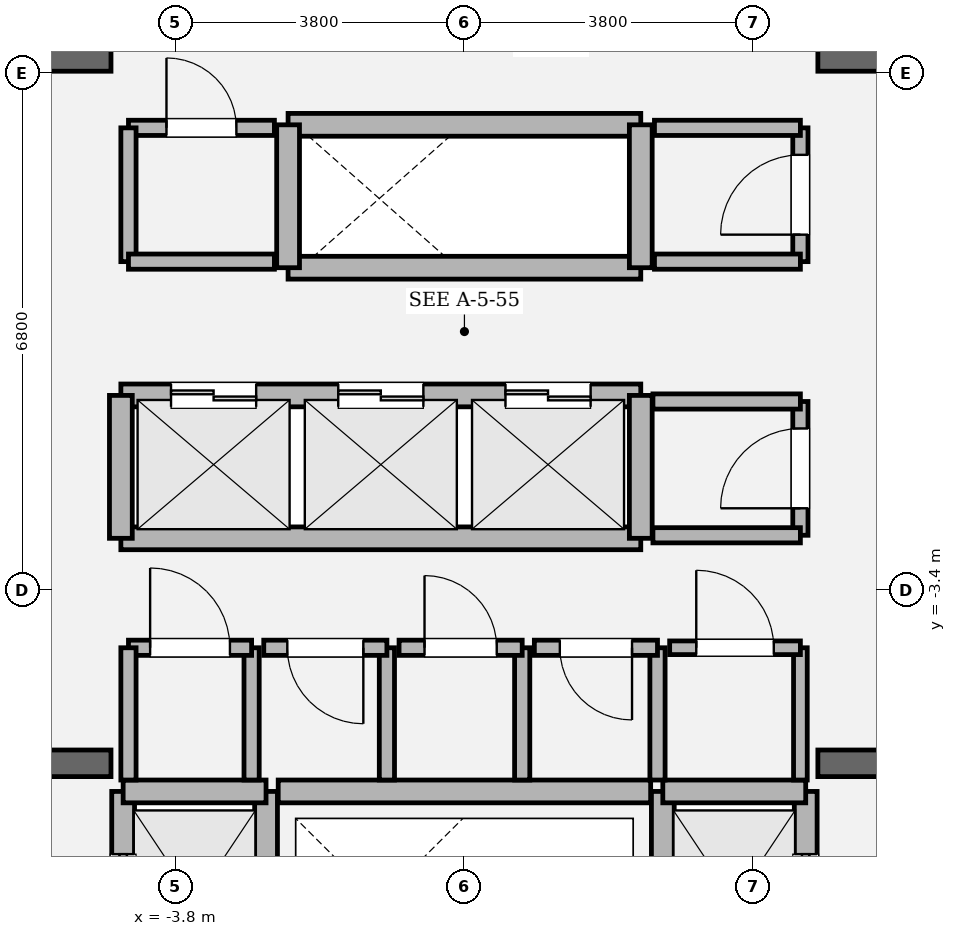
"""IFC4 building model, lengths in metres.
Left out: names, types, materials, properties, quantities, classifications, styles, units other than length and angle.
Written with IfcOpenShell. Run it as: python <this file> out.ifc"""

import sys

from ifc_helpers import new_model, si_unit, direction, frame, frame_2d, origin, place, context, subcontext, project, spatial, rectangle, extrude, element, fill, save


model = new_model("IFC4")
c1 = context("Model", 3, precision=1e-05, world=origin(), true_north=direction((0.0, 1.0)))
c2 = subcontext(c1, "Body", "Model", "MODEL_VIEW")
j1 = project(units=[si_unit("LENGTHUNIT", "METRE"), si_unit("PLANEANGLEUNIT", "RADIAN")], contexts=[c1])
p1 = place(None, origin())
s1 = spatial("IfcSite", under=j1, at=p1, CompositionType="ELEMENT")
p2 = place(p1, origin())
s2 = spatial("IfcBuilding", under=s1, at=p2, CompositionType="ELEMENT")
p3 = place(p2, frame((0.0, 0.0, 271.65)))
s3 = spatial("IfcBuildingStorey", under=s2, at=p3, CompositionType="ELEMENT", Elevation=271.65)
p4 = place(p3, frame((-9.925, -5.68, 0.0), z_axis=(0.0, 0.0, 1.0), x_axis=(1.0, 0.0, 0.0)))
e1 = element("IfcWall", 1, at=p4, inside=s3, PredefinedType="SOLIDWALL", context=c2, shape_type="SweptSolid", body=[
    extrude(rectangle(XDim=5.275, YDim=0.35, at=frame_2d((2.638, 0.0))), origin(), (0.0, 0.0, 1.0), 4.05),
])
p5 = place(p4, frame((1.385, 0.0, 0.0)))
e2 = element("IfcOpeningElement", 2, at=p5, cuts=e1, PredefinedType="OPENING", context=c2, shape_type="SweptSolid", body=[
    extrude(rectangle(XDim=1.18, YDim=2.2, at=frame_2d((0.59, 1.1))), frame((0.0, 0.185, 0.0), z_axis=(0.0, -1.0, 0.0), x_axis=(1.0, 0.0, 0.0)), (0.0, 0.0, 1.0), 0.37),
])
p6 = place(p3, frame((4.65, -5.68, 0.0), z_axis=(0.0, 0.0, 1.0), x_axis=(1.0, 0.0, 0.0)))
e3 = element("IfcWall", 3, at=p6, inside=s3, PredefinedType="SOLIDWALL", context=c2, shape_type="SweptSolid", body=[
    extrude(rectangle(XDim=5.275, YDim=0.35, at=frame_2d((2.638, 0.0))), origin(), (0.0, 0.0, 1.0), 4.05),
])
p7 = place(p6, frame((2.71, 0.0, 0.0)))
e4 = element("IfcOpeningElement", 4, at=p7, cuts=e3, PredefinedType="OPENING", context=c2, shape_type="SweptSolid", body=[
    extrude(rectangle(XDim=1.18, YDim=2.2, at=frame_2d((0.59, 1.1))), frame((0.0, 0.185, 0.0), z_axis=(0.0, -1.0, 0.0), x_axis=(1.0, 0.0, 0.0)), (0.0, 0.0, 1.0), 0.37),
])
for number, where, z_axis, x_axis in (
    (5, (-9.925, 3.6, 0.0), (0.0, 0.0, 1.0), (1.0, 0.0, 0.0)),
    (6, (4.65, 3.6, 0.0), (0.0, 0.0, 1.0), (1.0, 0.0, 0.0)),
):
    element("IfcWall", number, at=place(p3, frame(where, z_axis=z_axis, x_axis=x_axis)), inside=s3, PredefinedType="SOLIDWALL", context=c2, shape_type="SweptSolid", body=[
        extrude(rectangle(XDim=5.275, YDim=0.35, at=frame_2d((2.638, 0.0))), origin(), (0.0, 0.0, 1.0), 4.05),
    ])
p8 = place(p3, frame((-4.49, -8.82, 0.0), z_axis=(0.0, 0.0, 1.0), x_axis=(0.0, 1.0, 0.0)))
e7 = element("IfcWall", 7, at=p8, inside=s3, PredefinedType="SOLIDWALL", context=c2, shape_type="SweptSolid", body=[
    extrude(rectangle(XDim=2.77, YDim=0.3, at=frame_2d((1.385, 0.0))), origin(), (0.0, 0.0, 1.0), 3.85),
])
p9 = place(p8, frame((0.825, 0.0, 0.0)))
e8 = element("IfcOpeningElement", 8, at=p9, cuts=e7, PredefinedType="OPENING", context=c2, shape_type="SweptSolid", body=[
    extrude(rectangle(XDim=1.12, YDim=2.25, at=frame_2d((0.56, 1.125))), frame((0.0, 0.16, 0.0), z_axis=(0.0, -1.0, 0.0), x_axis=(1.0, 0.0, 0.0)), (0.0, 0.0, 1.0), 0.32),
])
p10 = place(p3, frame((-2.61, -8.82, 0.0), z_axis=(0.0, 0.0, 1.0), x_axis=(0.0, 1.0, 0.0)))
e9 = element("IfcWall", 9, at=p10, inside=s3, PredefinedType="SOLIDWALL", context=c2, shape_type="SweptSolid", body=[
    extrude(rectangle(XDim=2.77, YDim=0.3, at=frame_2d((1.385, 0.0))), origin(), (0.0, 0.0, 1.0), 3.85),
])
p11 = place(p3, frame((-4.49, -6.05, 0.0), z_axis=(0.0, 0.0, 1.0), x_axis=(1.0, 0.0, 0.0)))
e10 = element("IfcWall", 10, at=p11, inside=s3, PredefinedType="SOLIDWALL", context=c2, shape_type="SweptSolid", body=[
    extrude(rectangle(XDim=1.88, YDim=0.3, at=frame_2d((0.94, 0.0))), origin(), (0.0, 0.0, 1.0), 3.85),
])
p12 = place(p3, frame((4.49, -8.82, 0.0), z_axis=(0.0, 0.0, 1.0), x_axis=(0.0, 1.0, 0.0)))
e11 = element("IfcWall", 11, at=p12, inside=s3, PredefinedType="SOLIDWALL", context=c2, shape_type="SweptSolid", body=[
    extrude(rectangle(XDim=2.77, YDim=0.3, at=frame_2d((1.385, 0.0))), origin(), (0.0, 0.0, 1.0), 3.85),
])
p13 = place(p12, frame((0.825, 0.0, 0.0)))
e12 = element("IfcOpeningElement", 12, at=p13, cuts=e11, PredefinedType="OPENING", context=c2, shape_type="SweptSolid", body=[
    extrude(rectangle(XDim=1.12, YDim=2.25, at=frame_2d((0.56, 1.125))), frame((0.0, 0.16, 0.0), z_axis=(0.0, -1.0, 0.0), x_axis=(1.0, 0.0, 0.0)), (0.0, 0.0, 1.0), 0.32),
])
p14 = place(p3, frame((2.61, -8.82, 0.0), z_axis=(0.0, 0.0, 1.0), x_axis=(0.0, 1.0, 0.0)))
e13 = element("IfcWall", 13, at=p14, inside=s3, PredefinedType="SOLIDWALL", context=c2, shape_type="SweptSolid", body=[
    extrude(rectangle(XDim=2.77, YDim=0.3, at=frame_2d((1.385, 0.0))), origin(), (0.0, 0.0, 1.0), 3.85),
])
p15 = place(p3, frame((2.61, -6.05, 0.0), z_axis=(0.0, 0.0, 1.0), x_axis=(1.0, 0.0, 0.0)))
e14 = element("IfcWall", 14, at=p15, inside=s3, PredefinedType="SOLIDWALL", context=c2, shape_type="SweptSolid", body=[
    extrude(rectangle(XDim=1.88, YDim=0.3, at=frame_2d((0.94, 0.0))), origin(), (0.0, 0.0, 1.0), 3.85),
])
p16 = place(p3, frame((-4.52, -0.84, 0.0), z_axis=(0.0, 0.0, 1.0), x_axis=(1.0, 0.0, 0.0)))
e15 = element("IfcWall", 15, at=p16, inside=s3, PredefinedType="SOLIDWALL", context=c2, shape_type="SweptSolid", body=[
    extrude(rectangle(XDim=6.84, YDim=0.3, at=frame_2d((3.42, 0.0))), origin(), (0.0, 0.0, 1.0), 3.85),
])
p17 = place(p16, frame((0.66, 0.0, 0.0)))
e16 = element("IfcOpeningElement", 16, at=p17, cuts=e15, PredefinedType="OPENING", context=c2, shape_type="SweptSolid", body=[
    extrude(rectangle(XDim=1.12, YDim=2.25, at=frame_2d((0.56, 1.125))), frame((0.0, 0.16, 0.0), z_axis=(0.0, -1.0, 0.0), x_axis=(1.0, 0.0, 0.0)), (0.0, 0.0, 1.0), 0.32),
])
p18 = place(p16, frame((2.86, 0.0, 0.0)))
e17 = element("IfcOpeningElement", 17, at=p18, cuts=e15, PredefinedType="OPENING", context=c2, shape_type="SweptSolid", body=[
    extrude(rectangle(XDim=1.12, YDim=2.25, at=frame_2d((0.56, 1.125))), frame((0.0, 0.16, 0.0), z_axis=(0.0, -1.0, 0.0), x_axis=(1.0, 0.0, 0.0)), (0.0, 0.0, 1.0), 0.32),
])
p19 = place(p16, frame((5.06, 0.0, 0.0)))
e18 = element("IfcOpeningElement", 18, at=p19, cuts=e15, PredefinedType="OPENING", context=c2, shape_type="SweptSolid", body=[
    extrude(rectangle(XDim=1.12, YDim=2.25, at=frame_2d((0.56, 1.125))), frame((0.0, 0.16, 0.0), z_axis=(0.0, -1.0, 0.0), x_axis=(1.0, 0.0, 0.0)), (0.0, 0.0, 1.0), 0.32),
])
p20 = place(p3, frame((-4.52, -2.72, 0.0), z_axis=(0.0, 0.0, 1.0), x_axis=(1.0, 0.0, 0.0)))
e19 = element("IfcWall", 19, at=p20, inside=s3, PredefinedType="SOLIDWALL", context=c2, shape_type="SweptSolid", body=[
    extrude(rectangle(XDim=6.84, YDim=0.3, at=frame_2d((3.42, 0.0))), origin(), (0.0, 0.0, 1.0), 3.85),
])
for number, where, z_axis, x_axis in (
    (20, (-4.52, -2.72, 0.0), (0.0, 0.0, 1.0), (0.0, 1.0, 0.0)),
    (21, (2.32, -2.72, 0.0), (0.0, 0.0, 1.0), (0.0, 1.0, 0.0)),
):
    element("IfcWall", number, at=place(p3, frame(where, z_axis=z_axis, x_axis=x_axis)), inside=s3, PredefinedType="SOLIDWALL", context=c2, shape_type="SweptSolid", body=[
        extrude(rectangle(XDim=1.88, YDim=0.3, at=frame_2d((0.94, 0.0))), origin(), (0.0, 0.0, 1.0), 3.85),
    ])
for number, where, z_axis, x_axis in (
    (22, (-2.32, 0.84, 0.0), (0.0, 0.0, 1.0), (1.0, 0.0, 0.0)),
    (23, (-2.32, 2.72, 0.0), (0.0, 0.0, 1.0), (1.0, 0.0, 0.0)),
):
    element("IfcWall", number, at=place(p3, frame(where, z_axis=z_axis, x_axis=x_axis)), inside=s3, PredefinedType="SOLIDWALL", context=c2, shape_type="SweptSolid", body=[
        extrude(rectangle(XDim=4.64, YDim=0.3, at=frame_2d((2.32, 0.0))), origin(), (0.0, 0.0, 1.0), 3.85),
    ])
for number, where, z_axis, x_axis in (
    (24, (-2.32, 0.84, 0.0), (0.0, 0.0, 1.0), (0.0, 1.0, 0.0)),
    (25, (2.32, 0.84, 0.0), (0.0, 0.0, 1.0), (0.0, 1.0, 0.0)),
):
    element("IfcWall", number, at=place(p3, frame(where, z_axis=z_axis, x_axis=x_axis)), inside=s3, PredefinedType="SOLIDWALL", context=c2, shape_type="SweptSolid", body=[
        extrude(rectangle(XDim=1.88, YDim=0.3, at=frame_2d((0.94, 0.0))), origin(), (0.0, 0.0, 1.0), 3.85),
    ])
p21 = place(p3, frame((-2.45, -6.05, 0.0), z_axis=(0.0, 0.0, 1.0), x_axis=(1.0, 0.0, 0.0)))
e26 = element("IfcWall", 26, at=p21, inside=s3, PredefinedType="SOLIDWALL", context=c2, shape_type="SweptSolid", body=[
    extrude(rectangle(XDim=4.9, YDim=0.3, at=frame_2d((2.45, 0.0))), origin(), (0.0, 0.0, 1.0), 3.85),
])
p22 = place(p3, frame((-2.8, -5.9, 0.0), z_axis=(0.0, 0.0, 1.0), x_axis=(0.0, 1.0, 0.0)))
e27 = element("IfcWall", 27, at=p22, inside=s3, PredefinedType="SOLIDWALL", context=c2, shape_type="SweptSolid", body=[
    extrude(rectangle(XDim=1.74, YDim=0.2, at=frame_2d((0.87, 0.0))), origin(), (0.0, 0.0, 1.0), 3.85),
])
p23 = place(p3, frame((-2.8, -4.16, 0.0), z_axis=(0.0, 0.0, 1.0), x_axis=(-1.0, 0.0, 0.0)))
e28 = element("IfcWall", 28, at=p23, inside=s3, PredefinedType="SOLIDWALL", context=c2, shape_type="SweptSolid", body=[
    extrude(rectangle(XDim=1.62, YDim=0.2, at=frame_2d((0.81, 0.0))), origin(), (0.0, 0.0, 1.0), 3.85),
])
p24 = place(p23, frame((0.285, 0.0, 0.0)))
e29 = element("IfcOpeningElement", 29, at=p24, cuts=e28, PredefinedType="OPENING", context=c2, shape_type="SweptSolid", body=[
    extrude(rectangle(XDim=1.05, YDim=2.2, at=frame_2d((0.525, 1.1))), frame((0.0, 0.11, 0.0), z_axis=(0.0, -1.0, 0.0), x_axis=(1.0, 0.0, 0.0)), (0.0, 0.0, 1.0), 0.22),
])
for number, where, z_axis, x_axis in (
    (30, (-4.42, -4.16, 0.0), (0.0, 0.0, 1.0), (0.0, -1.0, 0.0)),
    (31, (-1.02, -5.9, 0.0), (0.0, 0.0, 1.0), (0.0, 1.0, 0.0)),
):
    element("IfcWall", number, at=place(p3, frame(where, z_axis=z_axis, x_axis=x_axis)), inside=s3, PredefinedType="SOLIDWALL", context=c2, shape_type="SweptSolid", body=[
        extrude(rectangle(XDim=1.74, YDim=0.2, at=frame_2d((0.87, 0.0))), origin(), (0.0, 0.0, 1.0), 3.85),
    ])
p25 = place(p3, frame((-1.02, -4.16, 0.0), z_axis=(0.0, 0.0, 1.0), x_axis=(-1.0, 0.0, 0.0)))
e32 = element("IfcWall", 32, at=p25, inside=s3, PredefinedType="SOLIDWALL", context=c2, shape_type="SweptSolid", body=[
    extrude(rectangle(XDim=1.62, YDim=0.2, at=frame_2d((0.81, 0.0))), origin(), (0.0, 0.0, 1.0), 3.85),
])
p26 = place(p25, frame((0.31, 0.0, 0.0)))
e33 = element("IfcOpeningElement", 33, at=p26, cuts=e32, PredefinedType="OPENING", context=c2, shape_type="SweptSolid", body=[
    extrude(rectangle(XDim=1.0, YDim=2.15, at=frame_2d((0.5, 1.075))), frame((0.0, 0.11, 0.0), z_axis=(0.0, -1.0, 0.0), x_axis=(1.0, 0.0, 0.0)), (0.0, 0.0, 1.0), 0.22),
])
p27 = place(p3, frame((0.76, -5.9, 0.0), z_axis=(0.0, 0.0, 1.0), x_axis=(0.0, 1.0, 0.0)))
e34 = element("IfcWall", 34, at=p27, inside=s3, PredefinedType="SOLIDWALL", context=c2, shape_type="SweptSolid", body=[
    extrude(rectangle(XDim=1.74, YDim=0.2, at=frame_2d((0.87, 0.0))), origin(), (0.0, 0.0, 1.0), 3.85),
])
p28 = place(p3, frame((0.76, -4.16, 0.0), z_axis=(0.0, 0.0, 1.0), x_axis=(-1.0, 0.0, 0.0)))
e35 = element("IfcWall", 35, at=p28, inside=s3, PredefinedType="SOLIDWALL", context=c2, shape_type="SweptSolid", body=[
    extrude(rectangle(XDim=1.62, YDim=0.2, at=frame_2d((0.81, 0.0))), origin(), (0.0, 0.0, 1.0), 3.85),
])
p29 = place(p28, frame((0.335, 0.0, 0.0)))
e36 = element("IfcOpeningElement", 36, at=p29, cuts=e35, PredefinedType="OPENING", context=c2, shape_type="SweptSolid", body=[
    extrude(rectangle(XDim=0.95, YDim=2.15, at=frame_2d((0.475, 1.075))), frame((0.0, 0.11, 0.0), z_axis=(0.0, -1.0, 0.0), x_axis=(1.0, 0.0, 0.0)), (0.0, 0.0, 1.0), 0.22),
])
p30 = place(p3, frame((2.54, -5.9, 0.0), z_axis=(0.0, 0.0, 1.0), x_axis=(0.0, 1.0, 0.0)))
e37 = element("IfcWall", 37, at=p30, inside=s3, PredefinedType="SOLIDWALL", context=c2, shape_type="SweptSolid", body=[
    extrude(rectangle(XDim=1.74, YDim=0.2, at=frame_2d((0.87, 0.0))), origin(), (0.0, 0.0, 1.0), 3.85),
])
p31 = place(p3, frame((2.54, -4.16, 0.0), z_axis=(0.0, 0.0, 1.0), x_axis=(-1.0, 0.0, 0.0)))
e38 = element("IfcWall", 38, at=p31, inside=s3, PredefinedType="SOLIDWALL", context=c2, shape_type="SweptSolid", body=[
    extrude(rectangle(XDim=1.62, YDim=0.2, at=frame_2d((0.81, 0.0))), origin(), (0.0, 0.0, 1.0), 3.85),
])
p32 = place(p31, frame((0.335, 0.0, 0.0)))
e39 = element("IfcOpeningElement", 39, at=p32, cuts=e38, PredefinedType="OPENING", context=c2, shape_type="SweptSolid", body=[
    extrude(rectangle(XDim=0.95, YDim=2.15, at=frame_2d((0.475, 1.075))), frame((0.0, 0.11, 0.0), z_axis=(0.0, -1.0, 0.0), x_axis=(1.0, 0.0, 0.0)), (0.0, 0.0, 1.0), 0.22),
])
p33 = place(p3, frame((4.42, -5.9, 0.0), z_axis=(0.0, 0.0, 1.0), x_axis=(0.0, 1.0, 0.0)))
e40 = element("IfcWall", 40, at=p33, inside=s3, PredefinedType="PARTITIONING", context=c2, shape_type="SweptSolid", body=[
    extrude(rectangle(XDim=1.74, YDim=0.18, at=frame_2d((0.87, 0.0))), origin(), (0.0, 0.0, 1.0), 3.85),
])
p34 = place(p3, frame((4.42, -4.16, 0.0), z_axis=(0.0, 0.0, 1.0), x_axis=(-1.0, 0.0, 0.0)))
e41 = element("IfcWall", 41, at=p34, inside=s3, PredefinedType="PARTITIONING", context=c2, shape_type="SweptSolid", body=[
    extrude(rectangle(XDim=1.72, YDim=0.18, at=frame_2d((0.86, 0.0))), origin(), (0.0, 0.0, 1.0), 3.85),
])
p35 = place(p34, frame((0.35, 0.0, 0.0)))
e42 = element("IfcOpeningElement", 42, at=p35, cuts=e41, PredefinedType="OPENING", context=c2, shape_type="SweptSolid", body=[
    extrude(rectangle(XDim=1.02, YDim=2.2, at=frame_2d((0.51, 1.1))), frame((0.0, 0.1, 0.0), z_axis=(0.0, -1.0, 0.0), x_axis=(1.0, 0.0, 0.0)), (0.0, 0.0, 1.0), 0.2),
])
p36 = place(p3, frame((4.42, -2.68, 0.0), z_axis=(0.0, 0.0, 1.0), x_axis=(0.0, 1.0, 0.0)))
e43 = element("IfcWall", 43, at=p36, inside=s3, PredefinedType="SOLIDWALL", context=c2, shape_type="SweptSolid", body=[
    extrude(rectangle(XDim=1.76, YDim=0.2, at=frame_2d((0.88, 0.0))), origin(), (0.0, 0.0, 1.0), 3.85),
])
p37 = place(p36, frame((0.355, 0.0, 0.0)))
e44 = element("IfcOpeningElement", 44, at=p37, cuts=e43, PredefinedType="OPENING", context=c2, shape_type="SweptSolid", body=[
    extrude(rectangle(XDim=1.05, YDim=2.2, at=frame_2d((0.525, 1.1))), frame((0.0, 0.11, 0.0), z_axis=(0.0, -1.0, 0.0), x_axis=(1.0, 0.0, 0.0)), (0.0, 0.0, 1.0), 0.22),
])
for number, where, z_axis, x_axis in (
    (45, (4.42, -0.92, 0.0), (0.0, 0.0, 1.0), (-1.0, 0.0, 0.0)),
    (46, (2.48, -2.68, 0.0), (0.0, 0.0, 1.0), (1.0, 0.0, 0.0)),
):
    element("IfcWall", number, at=place(p3, frame(where, z_axis=z_axis, x_axis=x_axis)), inside=s3, PredefinedType="SOLIDWALL", context=c2, shape_type="SweptSolid", body=[
        extrude(rectangle(XDim=1.94, YDim=0.2, at=frame_2d((0.97, 0.0))), origin(), (0.0, 0.0, 1.0), 3.85),
    ])
p38 = place(p3, frame((-2.5, 2.68, 0.0), z_axis=(0.0, 0.0, 1.0), x_axis=(-1.0, 0.0, 0.0)))
e47 = element("IfcWall", 47, at=p38, inside=s3, PredefinedType="SOLIDWALL", context=c2, shape_type="SweptSolid", body=[
    extrude(rectangle(XDim=1.92, YDim=0.2, at=frame_2d((0.96, 0.0))), origin(), (0.0, 0.0, 1.0), 3.85),
])
p39 = place(p38, frame((0.5, 0.0, 0.0)))
e48 = element("IfcOpeningElement", 48, at=p39, cuts=e47, PredefinedType="OPENING", context=c2, shape_type="SweptSolid", body=[
    extrude(rectangle(XDim=0.92, YDim=2.1, at=frame_2d((0.46, 1.05))), frame((0.0, 0.11, 0.0), z_axis=(0.0, -1.0, 0.0), x_axis=(1.0, 0.0, 0.0)), (0.0, 0.0, 1.0), 0.22),
])
p40 = place(p3, frame((-4.42, 2.68, 0.0), z_axis=(0.0, 0.0, 1.0), x_axis=(0.0, -1.0, 0.0)))
e49 = element("IfcWall", 49, at=p40, inside=s3, PredefinedType="SOLIDWALL", context=c2, shape_type="SweptSolid", body=[
    extrude(rectangle(XDim=1.76, YDim=0.2, at=frame_2d((0.88, 0.0))), origin(), (0.0, 0.0, 1.0), 3.85),
])
p41 = place(p3, frame((-4.42, 0.92, 0.0), z_axis=(0.0, 0.0, 1.0), x_axis=(1.0, 0.0, 0.0)))
e50 = element("IfcWall", 50, at=p41, inside=s3, PredefinedType="SOLIDWALL", context=c2, shape_type="SweptSolid", body=[
    extrude(rectangle(XDim=1.92, YDim=0.2, at=frame_2d((0.96, 0.0))), origin(), (0.0, 0.0, 1.0), 3.85),
])
p42 = place(p3, frame((4.42, 0.92, 0.0), z_axis=(0.0, 0.0, 1.0), x_axis=(0.0, 1.0, 0.0)))
e51 = element("IfcWall", 51, at=p42, inside=s3, PredefinedType="SOLIDWALL", context=c2, shape_type="SweptSolid", body=[
    extrude(rectangle(XDim=1.76, YDim=0.2, at=frame_2d((0.88, 0.0))), origin(), (0.0, 0.0, 1.0), 3.85),
])
p43 = place(p42, frame((0.355, 0.0, 0.0)))
e52 = element("IfcOpeningElement", 52, at=p43, cuts=e51, PredefinedType="OPENING", context=c2, shape_type="SweptSolid", body=[
    extrude(rectangle(XDim=1.05, YDim=2.2, at=frame_2d((0.525, 1.1))), frame((0.0, 0.11, 0.0), z_axis=(0.0, -1.0, 0.0), x_axis=(1.0, 0.0, 0.0)), (0.0, 0.0, 1.0), 0.22),
])
for number, where, z_axis, x_axis in (
    (53, (4.42, 2.68, 0.0), (0.0, 0.0, 1.0), (-1.0, 0.0, 0.0)),
    (54, (2.5, 0.92, 0.0), (0.0, 0.0, 1.0), (1.0, 0.0, 0.0)),
):
    element("IfcWall", number, at=place(p3, frame(where, z_axis=z_axis, x_axis=x_axis)), inside=s3, PredefinedType="SOLIDWALL", context=c2, shape_type="SweptSolid", body=[
        extrude(rectangle(XDim=1.92, YDim=0.2, at=frame_2d((0.96, 0.0))), origin(), (0.0, 0.0, 1.0), 3.85),
    ])
p44 = place(p9, origin())
e55 = element("IfcDoor", 55, at=p44, inside=s3, OperationType="SLIDING_TO_LEFT", PredefinedType="DOOR", context=c2, shape_type="SweptSolid", body=[
    extrude(rectangle(XDim=1.12, YDim=2.25, at=frame_2d((0.56, 1.125))), frame((0.0, 0.025, 0.0), z_axis=(0.0, -1.0, 0.0), x_axis=(1.0, 0.0, 0.0)), (0.0, 0.0, 1.0), 0.05),
])
fill(e8, e55)
p45 = place(p13, origin())
e56 = element("IfcDoor", 56, at=p45, inside=s3, OperationType="SLIDING_TO_RIGHT", PredefinedType="DOOR", context=c2, shape_type="SweptSolid", body=[
    extrude(rectangle(XDim=1.12, YDim=2.25, at=frame_2d((0.56, 1.125))), frame((0.0, 0.025, 0.0), z_axis=(0.0, -1.0, 0.0), x_axis=(1.0, 0.0, 0.0)), (0.0, 0.0, 1.0), 0.05),
])
fill(e12, e56)
p46 = place(p17, origin())
e57 = element("IfcDoor", 57, at=p46, inside=s3, OperationType="DOUBLE_DOOR_SLIDING", PredefinedType="DOOR", context=c2, shape_type="SweptSolid", body=[
    extrude(rectangle(XDim=1.12, YDim=2.25, at=frame_2d((0.56, 1.125))), frame((0.0, 0.025, 0.0), z_axis=(0.0, -1.0, 0.0), x_axis=(1.0, 0.0, 0.0)), (0.0, 0.0, 1.0), 0.05),
])
fill(e16, e57)
p47 = place(p18, origin())
e58 = element("IfcDoor", 58, at=p47, inside=s3, OperationType="DOUBLE_DOOR_SLIDING", PredefinedType="DOOR", context=c2, shape_type="SweptSolid", body=[
    extrude(rectangle(XDim=1.12, YDim=2.25, at=frame_2d((0.56, 1.125))), frame((0.0, 0.025, 0.0), z_axis=(0.0, -1.0, 0.0), x_axis=(1.0, 0.0, 0.0)), (0.0, 0.0, 1.0), 0.05),
])
fill(e17, e58)
p48 = place(p19, origin())
e59 = element("IfcDoor", 59, at=p48, inside=s3, OperationType="DOUBLE_DOOR_SLIDING", PredefinedType="DOOR", context=c2, shape_type="SweptSolid", body=[
    extrude(rectangle(XDim=1.12, YDim=2.25, at=frame_2d((0.56, 1.125))), frame((0.0, 0.025, 0.0), z_axis=(0.0, -1.0, 0.0), x_axis=(1.0, 0.0, 0.0)), (0.0, 0.0, 1.0), 0.05),
])
fill(e18, e59)
p49 = place(p24, origin())
e60 = element("IfcDoor", 60, at=p49, inside=s3, OperationType="SINGLE_SWING_RIGHT", PredefinedType="DOOR", context=c2, shape_type="SweptSolid", body=[
    extrude(rectangle(XDim=1.05, YDim=2.2, at=frame_2d((0.525, 1.1))), frame((0.0, 0.025, 0.0), z_axis=(0.0, -1.0, 0.0), x_axis=(1.0, 0.0, 0.0)), (0.0, 0.0, 1.0), 0.05),
])
fill(e29, e60)
p50 = place(p26, origin())
e61 = element("IfcDoor", 61, at=p50, inside=s3, OperationType="SINGLE_SWING_LEFT", PredefinedType="DOOR", context=c2, shape_type="SweptSolid", body=[
    extrude(rectangle(XDim=1.0, YDim=2.15, at=frame_2d((0.5, 1.075))), frame((0.0, 0.025, 0.0), z_axis=(0.0, -1.0, 0.0), x_axis=(1.0, 0.0, 0.0)), (0.0, 0.0, 1.0), 0.05),
])
fill(e33, e61)
p51 = place(p29, origin())
e62 = element("IfcDoor", 62, at=p51, inside=s3, OperationType="SINGLE_SWING_RIGHT", PredefinedType="DOOR", context=c2, shape_type="SweptSolid", body=[
    extrude(rectangle(XDim=0.95, YDim=2.15, at=frame_2d((0.475, 1.075))), frame((0.0, 0.025, 0.0), z_axis=(0.0, -1.0, 0.0), x_axis=(1.0, 0.0, 0.0)), (0.0, 0.0, 1.0), 0.05),
])
fill(e36, e62)
p52 = place(p32, origin())
e63 = element("IfcDoor", 63, at=p52, inside=s3, OperationType="SINGLE_SWING_LEFT", PredefinedType="DOOR", context=c2, shape_type="SweptSolid", body=[
    extrude(rectangle(XDim=0.95, YDim=2.15, at=frame_2d((0.475, 1.075))), frame((0.0, 0.025, 0.0), z_axis=(0.0, -1.0, 0.0), x_axis=(1.0, 0.0, 0.0)), (0.0, 0.0, 1.0), 0.05),
])
fill(e39, e63)
p53 = place(p35, origin())
e64 = element("IfcDoor", 64, at=p53, inside=s3, OperationType="SINGLE_SWING_RIGHT", PredefinedType="DOOR", context=c2, shape_type="SweptSolid", body=[
    extrude(rectangle(XDim=1.02, YDim=2.2, at=frame_2d((0.51, 1.1))), frame((0.0, 0.025, 0.0), z_axis=(0.0, -1.0, 0.0), x_axis=(1.0, 0.0, 0.0)), (0.0, 0.0, 1.0), 0.05),
])
fill(e42, e64)
p54 = place(p37, origin())
e65 = element("IfcDoor", 65, at=p54, inside=s3, OperationType="SINGLE_SWING_LEFT", PredefinedType="DOOR", context=c2, shape_type="SweptSolid", body=[
    extrude(rectangle(XDim=1.05, YDim=2.2, at=frame_2d((0.525, 1.1))), frame((0.0, 0.025, 0.0), z_axis=(0.0, -1.0, 0.0), x_axis=(1.0, 0.0, 0.0)), (0.0, 0.0, 1.0), 0.05),
])
fill(e44, e65)
p55 = place(p39, origin())
e66 = element("IfcDoor", 66, at=p55, inside=s3, OperationType="SINGLE_SWING_RIGHT", PredefinedType="DOOR", context=c2, shape_type="SweptSolid", body=[
    extrude(rectangle(XDim=0.92, YDim=2.1, at=frame_2d((0.46, 1.05))), frame((0.0, 0.025, 0.0), z_axis=(0.0, -1.0, 0.0), x_axis=(1.0, 0.0, 0.0)), (0.0, 0.0, 1.0), 0.05),
])
fill(e48, e66)
p56 = place(p43, origin())
e67 = element("IfcDoor", 67, at=p56, inside=s3, OperationType="SINGLE_SWING_LEFT", PredefinedType="DOOR", context=c2, shape_type="SweptSolid", body=[
    extrude(rectangle(XDim=1.05, YDim=2.2, at=frame_2d((0.525, 1.1))), frame((0.0, 0.025, 0.0), z_axis=(0.0, -1.0, 0.0), x_axis=(1.0, 0.0, 0.0)), (0.0, 0.0, 1.0), 0.05),
])
fill(e52, e67)
save(model, sys.argv[1])
